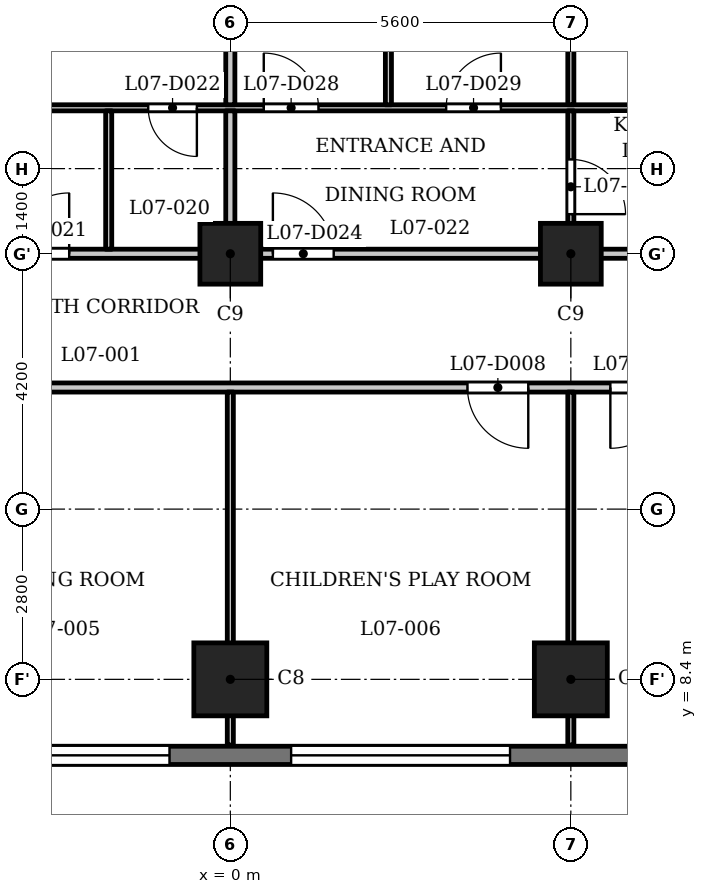
"""IFC4 building model, lengths in metres.
Left out: names, types, materials, properties, quantities, classifications, styles, units other than length and angle.
Written with IfcOpenShell. Run it as: python <this file> out.ifc"""

import sys

from ifc_helpers import new_model, si_unit, direction, frame, frame_2d, origin, origin_2d, place, context, subcontext, project, spatial, rectangle, extrude, element, fill, save


model = new_model("IFC4")
c1 = context("Model", 3, precision=1e-05, world=origin(), true_north=direction((0.0, 1.0)))
c2 = subcontext(c1, "Body", "Model", "MODEL_VIEW")
j1 = project(units=[si_unit("LENGTHUNIT", "METRE"), si_unit("PLANEANGLEUNIT", "RADIAN")], contexts=[c1])
p1 = place(None, origin())
s1 = spatial("IfcSite", under=j1, at=p1, CompositionType="ELEMENT")
p2 = place(p1, origin())
s2 = spatial("IfcBuilding", under=s1, at=p2, CompositionType="ELEMENT")
p3 = place(p2, frame((0.0, 0.0, 34.0)))
s3 = spatial("IfcBuildingStorey", under=s2, at=p3, CompositionType="ELEMENT", Elevation=34.0)
for number, where, z_axis, x_axis in (
    (1, (0.0, 8.4, 0.0), (0.0, 0.0, 1.0), (1.0, 0.0, 0.0)),
    (2, (5.6, 8.4, 0.0), (0.0, 0.0, 1.0), (1.0, 0.0, 0.0)),
):
    element("IfcColumn", number, at=place(p3, frame(where, z_axis=z_axis, x_axis=x_axis)), inside=s3, PredefinedType="COLUMN", context=c2, shape_type="SweptSolid", body=[
        extrude(rectangle(XDim=1.2, YDim=1.2, at=origin_2d()), origin(), (0.0, 0.0, 1.0), 3.5),
    ])
for number, where, z_axis, x_axis in (
    (3, (0.0, 15.4, 0.0), (0.0, 0.0, 1.0), (1.0, 0.0, 0.0)),
    (4, (5.6, 15.4, 0.0), (0.0, 0.0, 1.0), (1.0, 0.0, 0.0)),
):
    element("IfcColumn", number, at=place(p3, frame(where, z_axis=z_axis, x_axis=x_axis)), inside=s3, PredefinedType="COLUMN", context=c2, shape_type="SweptSolid", body=[
        extrude(rectangle(XDim=1.0, YDim=1.0, at=origin_2d()), origin(), (0.0, 0.0, 1.0), 3.5),
    ])
p4 = place(p3, frame((-13.8, 7.15, 0.0), z_axis=(0.0, 0.0, 1.0), x_axis=(1.0, 0.0, 0.0)))
e5 = element("IfcWall", 5, at=p4, inside=s3, PredefinedType="SOLIDWALL", context=c2, shape_type="SweptSolid", body=[
    extrude(rectangle(XDim=27.6, YDim=0.3, at=frame_2d((13.8, 0.0))), origin(), (0.0, 0.0, 1.0), 3.2),
])
p5 = place(p4, frame((0.363, 0.0, 0.9)))
e6 = element("IfcOpeningElement", 6, at=p5, cuts=e5, PredefinedType="OPENING", context=c2, shape_type="SweptSolid", body=[
    extrude(rectangle(XDim=1.8, YDim=1.25, at=frame_2d((0.9, 0.625))), frame((0.0, 0.16, 0.0), z_axis=(0.0, -1.0, 0.0), x_axis=(1.0, 0.0, 0.0)), (0.0, 0.0, 1.0), 0.32),
])
p6 = place(p4, frame((3.6, 0.0, 1.2)))
e7 = element("IfcOpeningElement", 7, at=p6, cuts=e5, PredefinedType="OPENING", context=c2, shape_type="SweptSolid", body=[
    extrude(rectangle(XDim=3.6, YDim=0.95, at=frame_2d((1.8, 0.475))), frame((0.0, 0.16, 0.0), z_axis=(0.0, -1.0, 0.0), x_axis=(1.0, 0.0, 0.0)), (0.0, 0.0, 1.0), 0.32),
])
p7 = place(p4, frame((9.2, 0.0, 1.2)))
e8 = element("IfcOpeningElement", 8, at=p7, cuts=e5, PredefinedType="OPENING", context=c2, shape_type="SweptSolid", body=[
    extrude(rectangle(XDim=3.6, YDim=0.95, at=frame_2d((1.8, 0.475))), frame((0.0, 0.16, 0.0), z_axis=(0.0, -1.0, 0.0), x_axis=(1.0, 0.0, 0.0)), (0.0, 0.0, 1.0), 0.32),
])
p8 = place(p4, frame((14.8, 0.0, 1.2)))
e9 = element("IfcOpeningElement", 9, at=p8, cuts=e5, PredefinedType="OPENING", context=c2, shape_type="SweptSolid", body=[
    extrude(rectangle(XDim=3.6, YDim=0.95, at=frame_2d((1.8, 0.475))), frame((0.0, 0.16, 0.0), z_axis=(0.0, -1.0, 0.0), x_axis=(1.0, 0.0, 0.0)), (0.0, 0.0, 1.0), 0.32),
])
p9 = place(p4, frame((20.4, 0.0, 1.2)))
e10 = element("IfcOpeningElement", 10, at=p9, cuts=e5, PredefinedType="OPENING", context=c2, shape_type="SweptSolid", body=[
    extrude(rectangle(XDim=3.6, YDim=0.95, at=frame_2d((1.8, 0.475))), frame((0.0, 0.16, 0.0), z_axis=(0.0, -1.0, 0.0), x_axis=(1.0, 0.0, 0.0)), (0.0, 0.0, 1.0), 0.32),
])
p10 = place(p4, frame((25.438, 0.0, 0.9)))
e11 = element("IfcOpeningElement", 11, at=p10, cuts=e5, PredefinedType="OPENING", context=c2, shape_type="SweptSolid", body=[
    extrude(rectangle(XDim=1.8, YDim=1.25, at=frame_2d((0.9, 0.625))), frame((0.0, 0.16, 0.0), z_axis=(0.0, -1.0, 0.0), x_axis=(1.0, 0.0, 0.0)), (0.0, 0.0, 1.0), 0.32),
])
p11 = place(p3, frame((-17.4, 13.2, 0.0), z_axis=(0.0, 0.0, 1.0), x_axis=(1.0, 0.0, 0.0)))
e12 = element("IfcWall", 12, at=p11, inside=s3, PredefinedType="PARTITIONING", context=c2, shape_type="SweptSolid", body=[
    extrude(rectangle(XDim=34.8, YDim=0.15, at=frame_2d((17.4, 0.0))), origin(), (0.0, 0.0, 1.0), 3.2),
])
p12 = place(p11, frame((0.75, 0.0, 0.0)))
e13 = element("IfcOpeningElement", 13, at=p12, cuts=e12, PredefinedType="OPENING", context=c2, shape_type="SweptSolid", body=[
    extrude(rectangle(XDim=1.0, YDim=2.1, at=frame_2d((0.5, 1.05))), frame((0.0, 0.085, 0.0), z_axis=(0.0, -1.0, 0.0), x_axis=(1.0, 0.0, 0.0)), (0.0, 0.0, 1.0), 0.17),
])
p13 = place(p11, frame((33.15, 0.0, 0.0)))
e14 = element("IfcOpeningElement", 14, at=p13, cuts=e12, PredefinedType="OPENING", context=c2, shape_type="SweptSolid", body=[
    extrude(rectangle(XDim=1.0, YDim=2.1, at=frame_2d((0.5, 1.05))), frame((0.0, 0.085, 0.0), z_axis=(0.0, -1.0, 0.0), x_axis=(1.0, 0.0, 0.0)), (0.0, 0.0, 1.0), 0.17),
])
p14 = place(p11, frame((3.05, 0.0, 0.0)))
e15 = element("IfcOpeningElement", 15, at=p14, cuts=e12, PredefinedType="OPENING", context=c2, shape_type="SweptSolid", body=[
    extrude(rectangle(XDim=1.0, YDim=2.1, at=frame_2d((0.5, 1.05))), frame((0.0, 0.085, 0.0), z_axis=(0.0, -1.0, 0.0), x_axis=(1.0, 0.0, 0.0)), (0.0, 0.0, 1.0), 0.17),
])
p15 = place(p11, frame((10.1, 0.0, 0.0)))
e16 = element("IfcOpeningElement", 16, at=p15, cuts=e12, PredefinedType="OPENING", context=c2, shape_type="SweptSolid", body=[
    extrude(rectangle(XDim=1.0, YDim=2.1, at=frame_2d((0.5, 1.05))), frame((0.0, 0.085, 0.0), z_axis=(0.0, -1.0, 0.0), x_axis=(1.0, 0.0, 0.0)), (0.0, 0.0, 1.0), 0.17),
])
p16 = place(p11, frame((12.45, 0.0, 0.0)))
e17 = element("IfcOpeningElement", 17, at=p16, cuts=e12, PredefinedType="OPENING", context=c2, shape_type="SweptSolid", body=[
    extrude(rectangle(XDim=1.0, YDim=2.1, at=frame_2d((0.5, 1.05))), frame((0.0, 0.085, 0.0), z_axis=(0.0, -1.0, 0.0), x_axis=(1.0, 0.0, 0.0)), (0.0, 0.0, 1.0), 0.17),
])
p17 = place(p11, frame((21.3, 0.0, 0.0)))
e18 = element("IfcOpeningElement", 18, at=p17, cuts=e12, PredefinedType="OPENING", context=c2, shape_type="SweptSolid", body=[
    extrude(rectangle(XDim=1.0, YDim=2.1, at=frame_2d((0.5, 1.05))), frame((0.0, 0.085, 0.0), z_axis=(0.0, -1.0, 0.0), x_axis=(1.0, 0.0, 0.0)), (0.0, 0.0, 1.0), 0.17),
])
p18 = place(p11, frame((23.65, 0.0, 0.0)))
e19 = element("IfcOpeningElement", 19, at=p18, cuts=e12, PredefinedType="OPENING", context=c2, shape_type="SweptSolid", body=[
    extrude(rectangle(XDim=1.0, YDim=2.1, at=frame_2d((0.5, 1.05))), frame((0.0, 0.085, 0.0), z_axis=(0.0, -1.0, 0.0), x_axis=(1.0, 0.0, 0.0)), (0.0, 0.0, 1.0), 0.17),
])
p19 = place(p11, frame((30.75, 0.0, 0.0)))
e20 = element("IfcOpeningElement", 20, at=p19, cuts=e12, PredefinedType="OPENING", context=c2, shape_type="SweptSolid", body=[
    extrude(rectangle(XDim=1.0, YDim=2.1, at=frame_2d((0.5, 1.05))), frame((0.0, 0.085, 0.0), z_axis=(0.0, -1.0, 0.0), x_axis=(1.0, 0.0, 0.0)), (0.0, 0.0, 1.0), 0.17),
])
p20 = place(p3, frame((-27.484, 15.4, 0.0), z_axis=(0.0, 0.0, 1.0), x_axis=(1.0, 0.0, 0.0)))
e21 = element("IfcWall", 21, at=p20, inside=s3, PredefinedType="PARTITIONING", context=c2, shape_type="SweptSolid", body=[
    extrude(rectangle(XDim=54.968, YDim=0.15, at=frame_2d((27.484, 0.0))), origin(), (0.0, 0.0, 1.0), 3.2),
])
p21 = place(p20, frame((8.784, 0.0, 0.0)))
e22 = element("IfcOpeningElement", 22, at=p21, cuts=e21, PredefinedType="OPENING", context=c2, shape_type="SweptSolid", body=[
    extrude(rectangle(XDim=1.0, YDim=2.1, at=frame_2d((0.5, 1.05))), frame((0.0, 0.085, 0.0), z_axis=(0.0, -1.0, 0.0), x_axis=(1.0, 0.0, 0.0)), (0.0, 0.0, 1.0), 0.17),
])
p22 = place(p20, frame((14.634, 0.0, 0.0)))
e23 = element("IfcOpeningElement", 23, at=p22, cuts=e21, PredefinedType="OPENING", context=c2, shape_type="SweptSolid", body=[
    extrude(rectangle(XDim=1.0, YDim=2.1, at=frame_2d((0.5, 1.05))), frame((0.0, 0.085, 0.0), z_axis=(0.0, -1.0, 0.0), x_axis=(1.0, 0.0, 0.0)), (0.0, 0.0, 1.0), 0.17),
])
p23 = place(p20, frame((23.834, 0.0, 0.0)))
e24 = element("IfcOpeningElement", 24, at=p23, cuts=e21, PredefinedType="OPENING", context=c2, shape_type="SweptSolid", body=[
    extrude(rectangle(XDim=1.0, YDim=2.1, at=frame_2d((0.5, 1.05))), frame((0.0, 0.085, 0.0), z_axis=(0.0, -1.0, 0.0), x_axis=(1.0, 0.0, 0.0)), (0.0, 0.0, 1.0), 0.17),
])
p24 = place(p20, frame((28.184, 0.0, 0.0)))
e25 = element("IfcOpeningElement", 25, at=p24, cuts=e21, PredefinedType="OPENING", context=c2, shape_type="SweptSolid", body=[
    extrude(rectangle(XDim=1.0, YDim=2.1, at=frame_2d((0.5, 1.05))), frame((0.0, 0.085, 0.0), z_axis=(0.0, -1.0, 0.0), x_axis=(1.0, 0.0, 0.0)), (0.0, 0.0, 1.0), 0.17),
])
p25 = place(p20, frame((41.884, 0.0, 0.0)))
e26 = element("IfcOpeningElement", 26, at=p25, cuts=e21, PredefinedType="OPENING", context=c2, shape_type="SweptSolid", body=[
    extrude(rectangle(XDim=1.0, YDim=2.1, at=frame_2d((0.5, 1.05))), frame((0.0, 0.085, 0.0), z_axis=(0.0, -1.0, 0.0), x_axis=(1.0, 0.0, 0.0)), (0.0, 0.0, 1.0), 0.17),
])
p26 = place(p20, frame((48.234, 0.0, 0.0)))
e27 = element("IfcOpeningElement", 27, at=p26, cuts=e21, PredefinedType="OPENING", context=c2, shape_type="SweptSolid", body=[
    extrude(rectangle(XDim=1.0, YDim=2.1, at=frame_2d((0.5, 1.05))), frame((0.0, 0.085, 0.0), z_axis=(0.0, -1.0, 0.0), x_axis=(1.0, 0.0, 0.0)), (0.0, 0.0, 1.0), 0.17),
])
p27 = place(p3, frame((-26.732, 17.8, 0.0), z_axis=(0.0, 0.0, 1.0), x_axis=(1.0, 0.0, 0.0)))
e28 = element("IfcWall", 28, at=p27, inside=s3, PredefinedType="PARTITIONING", context=c2, shape_type="SweptSolid", body=[
    extrude(rectangle(XDim=53.126, YDim=0.1, at=frame_2d((26.563, 0.0))), origin(), (0.0, 0.0, 1.0), 3.2),
])
p28 = place(p27, frame((2.964, 0.0, 0.0)))
e29 = element("IfcOpeningElement", 29, at=p28, cuts=e28, PredefinedType="OPENING", context=c2, shape_type="SweptSolid", body=[
    extrude(rectangle(XDim=0.8, YDim=2.1, at=frame_2d((0.4, 1.05))), frame((0.0, 0.06, 0.0), z_axis=(0.0, -1.0, 0.0), x_axis=(1.0, 0.0, 0.0)), (0.0, 0.0, 1.0), 0.12),
])
p29 = place(p27, frame((7.132, 0.0, 0.0)))
e30 = element("IfcOpeningElement", 30, at=p29, cuts=e28, PredefinedType="OPENING", context=c2, shape_type="SweptSolid", body=[
    extrude(rectangle(XDim=0.9, YDim=2.1, at=frame_2d((0.45, 1.05))), frame((0.0, 0.06, 0.0), z_axis=(0.0, -1.0, 0.0), x_axis=(1.0, 0.0, 0.0)), (0.0, 0.0, 1.0), 0.12),
])
p30 = place(p27, frame((19.432, 0.0, 0.0)))
e31 = element("IfcOpeningElement", 31, at=p30, cuts=e28, PredefinedType="OPENING", context=c2, shape_type="SweptSolid", body=[
    extrude(rectangle(XDim=0.8, YDim=2.1, at=frame_2d((0.4, 1.05))), frame((0.0, 0.06, 0.0), z_axis=(0.0, -1.0, 0.0), x_axis=(1.0, 0.0, 0.0)), (0.0, 0.0, 1.0), 0.12),
])
p31 = place(p27, frame((16.732, 0.0, 0.0)))
e32 = element("IfcOpeningElement", 32, at=p31, cuts=e28, PredefinedType="OPENING", context=c2, shape_type="SweptSolid", body=[
    extrude(rectangle(XDim=0.9, YDim=2.1, at=frame_2d((0.45, 1.05))), frame((0.0, 0.06, 0.0), z_axis=(0.0, -1.0, 0.0), x_axis=(1.0, 0.0, 0.0)), (0.0, 0.0, 1.0), 0.12),
])
p32 = place(p27, frame((10.982, 0.0, 0.0)))
e33 = element("IfcOpeningElement", 33, at=p32, cuts=e28, PredefinedType="OPENING", context=c2, shape_type="SweptSolid", body=[
    extrude(rectangle(XDim=0.9, YDim=2.1, at=frame_2d((0.45, 1.05))), frame((0.0, 0.06, 0.0), z_axis=(0.0, -1.0, 0.0), x_axis=(1.0, 0.0, 0.0)), (0.0, 0.0, 1.0), 0.12),
])
p33 = place(p27, frame((12.982, 0.0, 0.0)))
e34 = element("IfcOpeningElement", 34, at=p33, cuts=e28, PredefinedType="OPENING", context=c2, shape_type="SweptSolid", body=[
    extrude(rectangle(XDim=0.9, YDim=2.1, at=frame_2d((0.45, 1.05))), frame((0.0, 0.06, 0.0), z_axis=(0.0, -1.0, 0.0), x_axis=(1.0, 0.0, 0.0)), (0.0, 0.0, 1.0), 0.12),
])
p34 = place(p27, frame((25.382, 0.0, 0.0)))
e35 = element("IfcOpeningElement", 35, at=p34, cuts=e28, PredefinedType="OPENING", context=c2, shape_type="SweptSolid", body=[
    extrude(rectangle(XDim=0.8, YDim=2.1, at=frame_2d((0.4, 1.05))), frame((0.0, 0.06, 0.0), z_axis=(0.0, -1.0, 0.0), x_axis=(1.0, 0.0, 0.0)), (0.0, 0.0, 1.0), 0.12),
])
p35 = place(p27, frame((22.182, 0.0, 0.0)))
e36 = element("IfcOpeningElement", 36, at=p35, cuts=e28, PredefinedType="OPENING", context=c2, shape_type="SweptSolid", body=[
    extrude(rectangle(XDim=0.9, YDim=2.1, at=frame_2d((0.45, 1.05))), frame((0.0, 0.06, 0.0), z_axis=(0.0, -1.0, 0.0), x_axis=(1.0, 0.0, 0.0)), (0.0, 0.0, 1.0), 0.12),
])
p36 = place(p27, frame((36.232, 0.0, 0.0)))
e37 = element("IfcOpeningElement", 37, at=p36, cuts=e28, PredefinedType="OPENING", context=c2, shape_type="SweptSolid", body=[
    extrude(rectangle(XDim=0.8, YDim=2.1, at=frame_2d((0.4, 1.05))), frame((0.0, 0.06, 0.0), z_axis=(0.0, -1.0, 0.0), x_axis=(1.0, 0.0, 0.0)), (0.0, 0.0, 1.0), 0.12),
])
p37 = place(p27, frame((33.782, 0.0, 0.0)))
e38 = element("IfcOpeningElement", 38, at=p37, cuts=e28, PredefinedType="OPENING", context=c2, shape_type="SweptSolid", body=[
    extrude(rectangle(XDim=0.9, YDim=2.1, at=frame_2d((0.45, 1.05))), frame((0.0, 0.06, 0.0), z_axis=(0.0, -1.0, 0.0), x_axis=(1.0, 0.0, 0.0)), (0.0, 0.0, 1.0), 0.12),
])
p38 = place(p27, frame((27.282, 0.0, 0.0)))
e39 = element("IfcOpeningElement", 39, at=p38, cuts=e28, PredefinedType="OPENING", context=c2, shape_type="SweptSolid", body=[
    extrude(rectangle(XDim=0.9, YDim=2.1, at=frame_2d((0.45, 1.05))), frame((0.0, 0.06, 0.0), z_axis=(0.0, -1.0, 0.0), x_axis=(1.0, 0.0, 0.0)), (0.0, 0.0, 1.0), 0.12),
])
p39 = place(p27, frame((30.282, 0.0, 0.0)))
e40 = element("IfcOpeningElement", 40, at=p39, cuts=e28, PredefinedType="OPENING", context=c2, shape_type="SweptSolid", body=[
    extrude(rectangle(XDim=0.9, YDim=2.1, at=frame_2d((0.45, 1.05))), frame((0.0, 0.06, 0.0), z_axis=(0.0, -1.0, 0.0), x_axis=(1.0, 0.0, 0.0)), (0.0, 0.0, 1.0), 0.12),
])
p40 = place(p27, frame((38.582, 0.0, 0.0)))
e41 = element("IfcOpeningElement", 41, at=p40, cuts=e28, PredefinedType="OPENING", context=c2, shape_type="SweptSolid", body=[
    extrude(rectangle(XDim=0.8, YDim=2.1, at=frame_2d((0.4, 1.05))), frame((0.0, 0.06, 0.0), z_axis=(0.0, -1.0, 0.0), x_axis=(1.0, 0.0, 0.0)), (0.0, 0.0, 1.0), 0.12),
])
p41 = place(p27, frame((41.232, 0.0, 0.0)))
e42 = element("IfcOpeningElement", 42, at=p41, cuts=e28, PredefinedType="OPENING", context=c2, shape_type="SweptSolid", body=[
    extrude(rectangle(XDim=0.9, YDim=2.1, at=frame_2d((0.45, 1.05))), frame((0.0, 0.06, 0.0), z_axis=(0.0, -1.0, 0.0), x_axis=(1.0, 0.0, 0.0)), (0.0, 0.0, 1.0), 0.12),
])
p42 = place(p27, frame((51.532, 0.0, 0.0)))
e43 = element("IfcOpeningElement", 43, at=p42, cuts=e28, PredefinedType="OPENING", context=c2, shape_type="SweptSolid", body=[
    extrude(rectangle(XDim=0.8, YDim=2.1, at=frame_2d((0.4, 1.05))), frame((0.0, 0.06, 0.0), z_axis=(0.0, -1.0, 0.0), x_axis=(1.0, 0.0, 0.0)), (0.0, 0.0, 1.0), 0.12),
])
p43 = place(p27, frame((46.582, 0.0, 0.0)))
e44 = element("IfcOpeningElement", 44, at=p43, cuts=e28, PredefinedType="OPENING", context=c2, shape_type="SweptSolid", body=[
    extrude(rectangle(XDim=0.9, YDim=2.1, at=frame_2d((0.45, 1.05))), frame((0.0, 0.06, 0.0), z_axis=(0.0, -1.0, 0.0), x_axis=(1.0, 0.0, 0.0)), (0.0, 0.0, 1.0), 0.12),
])
p44 = place(p3, frame((-2.0, 15.475, 0.0), z_axis=(0.0, 0.0, 1.0), x_axis=(0.0, 1.0, 0.0)))
e45 = element("IfcWall", 45, at=p44, inside=s3, PredefinedType="PARTITIONING", context=c2, shape_type="SweptSolid", body=[
    extrude(rectangle(XDim=2.275, YDim=0.1, at=frame_2d((1.137, 0.0))), origin(), (0.0, 0.0, 1.0), 3.2),
])
p45 = place(p3, frame((0.0, 7.32, 0.0), z_axis=(0.0, 0.0, 1.0), x_axis=(0.0, 1.0, 0.0)))
e46 = element("IfcWall", 46, at=p45, inside=s3, PredefinedType="PARTITIONING", context=c2, shape_type="SweptSolid", body=[
    extrude(rectangle(XDim=5.805, YDim=0.1, at=frame_2d((2.902, 0.0))), origin(), (0.0, 0.0, 1.0), 3.2),
])
p46 = place(p3, frame((0.0, 15.475, 0.0), z_axis=(0.0, 0.0, 1.0), x_axis=(0.0, 1.0, 0.0)))
e47 = element("IfcWall", 47, at=p46, inside=s3, PredefinedType="PARTITIONING", context=c2, shape_type="SweptSolid", body=[
    extrude(rectangle(XDim=2.275, YDim=0.15, at=frame_2d((1.137, 0.0))), origin(), (0.0, 0.0, 1.0), 3.2),
])
p47 = place(p3, frame((0.0, 17.85, 0.0), z_axis=(0.0, 0.0, 1.0), x_axis=(0.0, 1.0, 0.0)))
e48 = element("IfcWall", 48, at=p47, inside=s3, PredefinedType="PARTITIONING", context=c2, shape_type="SweptSolid", body=[
    extrude(rectangle(XDim=5.28, YDim=0.15, at=frame_2d((2.64, 0.0))), origin(), (0.0, 0.0, 1.0), 3.2),
])
p48 = place(p3, frame((2.6, 17.85, 0.0), z_axis=(0.0, 0.0, 1.0), x_axis=(0.0, 1.0, 0.0)))
e49 = element("IfcWall", 49, at=p48, inside=s3, PredefinedType="PARTITIONING", context=c2, shape_type="SweptSolid", body=[
    extrude(rectangle(XDim=4.23, YDim=0.1, at=frame_2d((2.115, 0.0))), origin(), (0.0, 0.0, 1.0), 3.2),
])
p49 = place(p3, frame((5.6, 7.32, 0.0), z_axis=(0.0, 0.0, 1.0), x_axis=(0.0, 1.0, 0.0)))
e50 = element("IfcWall", 50, at=p49, inside=s3, PredefinedType="PARTITIONING", context=c2, shape_type="SweptSolid", body=[
    extrude(rectangle(XDim=5.805, YDim=0.1, at=frame_2d((2.902, 0.0))), origin(), (0.0, 0.0, 1.0), 3.2),
])
p50 = place(p3, frame((5.6, 15.475, 0.0), z_axis=(0.0, 0.0, 1.0), x_axis=(0.0, 1.0, 0.0)))
e51 = element("IfcWall", 51, at=p50, inside=s3, PredefinedType="PARTITIONING", context=c2, shape_type="SweptSolid", body=[
    extrude(rectangle(XDim=2.275, YDim=0.1, at=frame_2d((1.137, 0.0))), origin(), (0.0, 0.0, 1.0), 3.2),
])
p51 = place(p50, frame((0.576, 0.0, 0.0)))
e52 = element("IfcOpeningElement", 52, at=p51, cuts=e51, PredefinedType="OPENING", context=c2, shape_type="SweptSolid", body=[
    extrude(rectangle(XDim=0.9, YDim=2.1, at=frame_2d((0.45, 1.05))), frame((0.0, 0.06, 0.0), z_axis=(0.0, -1.0, 0.0), x_axis=(1.0, 0.0, 0.0)), (0.0, 0.0, 1.0), 0.12),
])
p52 = place(p3, frame((5.6, 17.85, 0.0), z_axis=(0.0, 0.0, 1.0), x_axis=(0.0, 1.0, 0.0)))
e53 = element("IfcWall", 53, at=p52, inside=s3, PredefinedType="PARTITIONING", context=c2, shape_type="SweptSolid", body=[
    extrude(rectangle(XDim=5.28, YDim=0.1, at=frame_2d((2.64, 0.0))), origin(), (0.0, 0.0, 1.0), 3.2),
])
p53 = place(p17, origin())
e54 = element("IfcDoor", 54, at=p53, inside=s3, OperationType="SINGLE_SWING_RIGHT", PredefinedType="DOOR", context=c2, shape_type="SweptSolid", body=[
    extrude(rectangle(XDim=1.0, YDim=2.1, at=frame_2d((0.5, 1.05))), frame((0.0, 0.025, 0.0), z_axis=(0.0, -1.0, 0.0), x_axis=(1.0, 0.0, 0.0)), (0.0, 0.0, 1.0), 0.05),
])
fill(e18, e54)
p54 = place(p18, origin())
e55 = element("IfcDoor", 55, at=p54, inside=s3, OperationType="SINGLE_SWING_LEFT", PredefinedType="DOOR", context=c2, shape_type="SweptSolid", body=[
    extrude(rectangle(XDim=1.0, YDim=2.1, at=frame_2d((0.5, 1.05))), frame((0.0, 0.025, 0.0), z_axis=(0.0, -1.0, 0.0), x_axis=(1.0, 0.0, 0.0)), (0.0, 0.0, 1.0), 0.05),
])
fill(e19, e55)
p55 = place(p23, origin())
e56 = element("IfcDoor", 56, at=p55, inside=s3, OperationType="SINGLE_SWING_LEFT", PredefinedType="DOOR", context=c2, shape_type="SweptSolid", body=[
    extrude(rectangle(XDim=1.0, YDim=2.1, at=frame_2d((0.5, 1.05))), frame((0.0, 0.025, 0.0), z_axis=(0.0, -1.0, 0.0), x_axis=(1.0, 0.0, 0.0)), (0.0, 0.0, 1.0), 0.05),
])
fill(e24, e56)
p56 = place(p34, origin())
e57 = element("IfcDoor", 57, at=p56, inside=s3, OperationType="SINGLE_SWING_RIGHT", PredefinedType="DOOR", context=c2, shape_type="SweptSolid", body=[
    extrude(rectangle(XDim=0.8, YDim=2.1, at=frame_2d((0.4, 1.05))), frame((0.0, 0.025, 0.0), z_axis=(0.0, -1.0, 0.0), x_axis=(1.0, 0.0, 0.0)), (0.0, 0.0, 1.0), 0.05),
])
fill(e35, e57)
p57 = place(p24, origin())
e58 = element("IfcDoor", 58, at=p57, inside=s3, OperationType="SINGLE_SWING_RIGHT", PredefinedType="DOOR", context=c2, shape_type="SweptSolid", body=[
    extrude(rectangle(XDim=1.0, YDim=2.1, at=frame_2d((0.5, 1.05))), frame((0.0, 0.025, 0.0), z_axis=(0.0, -1.0, 0.0), x_axis=(1.0, 0.0, 0.0)), (0.0, 0.0, 1.0), 0.05),
])
fill(e25, e58)
p58 = place(p51, origin())
e59 = element("IfcDoor", 59, at=p58, inside=s3, OperationType="SINGLE_SWING_LEFT", PredefinedType="DOOR", context=c2, shape_type="SweptSolid", body=[
    extrude(rectangle(XDim=0.9, YDim=2.1, at=frame_2d((0.45, 1.05))), frame((0.0, 0.025, 0.0), z_axis=(0.0, -1.0, 0.0), x_axis=(1.0, 0.0, 0.0)), (0.0, 0.0, 1.0), 0.05),
])
fill(e52, e59)
p59 = place(p38, origin())
e60 = element("IfcDoor", 60, at=p59, inside=s3, OperationType="SINGLE_SWING_RIGHT", PredefinedType="DOOR", context=c2, shape_type="SweptSolid", body=[
    extrude(rectangle(XDim=0.9, YDim=2.1, at=frame_2d((0.45, 1.05))), frame((0.0, 0.025, 0.0), z_axis=(0.0, -1.0, 0.0), x_axis=(1.0, 0.0, 0.0)), (0.0, 0.0, 1.0), 0.05),
])
fill(e39, e60)
p60 = place(p39, origin())
e61 = element("IfcDoor", 61, at=p60, inside=s3, OperationType="SINGLE_SWING_LEFT", PredefinedType="DOOR", context=c2, shape_type="SweptSolid", body=[
    extrude(rectangle(XDim=0.9, YDim=2.1, at=frame_2d((0.45, 1.05))), frame((0.0, 0.025, 0.0), z_axis=(0.0, -1.0, 0.0), x_axis=(1.0, 0.0, 0.0)), (0.0, 0.0, 1.0), 0.05),
])
fill(e40, e61)
p61 = place(p7, origin())
e62 = element("IfcWindow", 62, at=p61, inside=s3, PartitioningType="SINGLE_PANEL", PredefinedType="WINDOW", context=c2, shape_type="SweptSolid", body=[
    extrude(rectangle(XDim=3.6, YDim=0.95, at=frame_2d((1.8, 0.475))), frame((0.0, 0.03, 0.0), z_axis=(0.0, -1.0, 0.0), x_axis=(1.0, 0.0, 0.0)), (0.0, 0.0, 1.0), 0.06),
])
fill(e8, e62)
p62 = place(p8, origin())
e63 = element("IfcWindow", 63, at=p62, inside=s3, PartitioningType="SINGLE_PANEL", PredefinedType="WINDOW", context=c2, shape_type="SweptSolid", body=[
    extrude(rectangle(XDim=3.6, YDim=0.95, at=frame_2d((1.8, 0.475))), frame((0.0, 0.03, 0.0), z_axis=(0.0, -1.0, 0.0), x_axis=(1.0, 0.0, 0.0)), (0.0, 0.0, 1.0), 0.06),
])
fill(e9, e63)
save(model, sys.argv[1])
